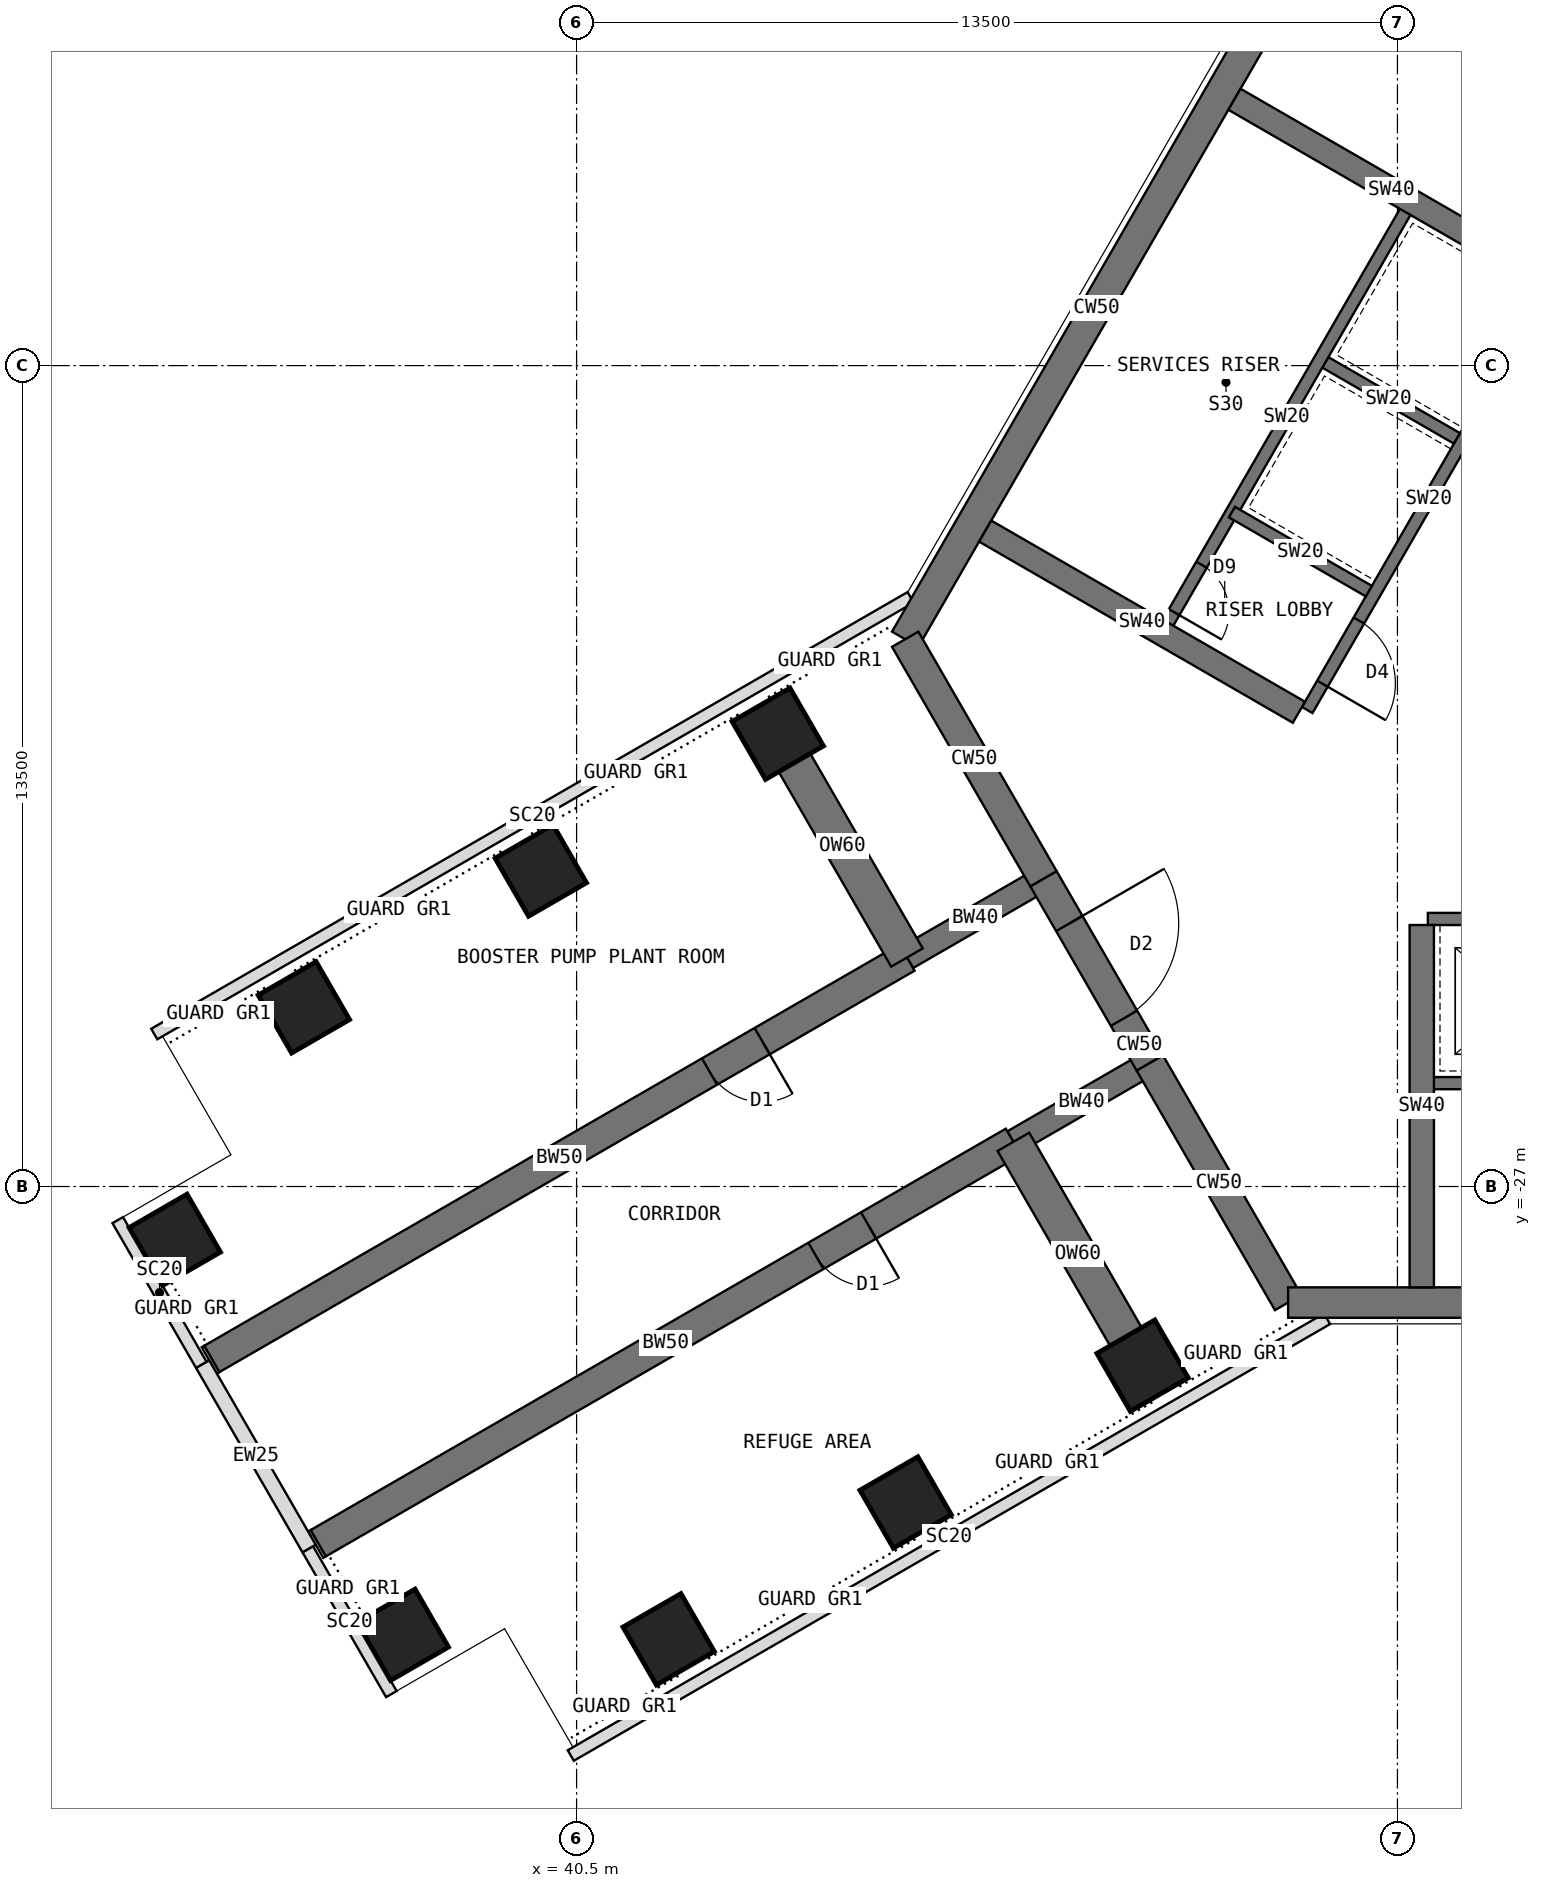
"""IFC4 building model, lengths in metres.
Left out: names, types, materials, properties, quantities, classifications, styles, units other than length and angle.
Written with IfcOpenShell. Run it as: python <this file> out.ifc"""

import sys

from ifc_helpers import new_model, si_unit, direction, frame, frame_2d, origin, origin_2d, place, context, subcontext, project, spatial, rectangle, extrude, element, fill, save


model = new_model("IFC4")
c1 = context("Model", 3, precision=1e-05, world=origin(), true_north=direction((0.0, 1.0)))
c2 = subcontext(c1, "Body", "Model", "MODEL_VIEW")
j1 = project(units=[si_unit("LENGTHUNIT", "METRE"), si_unit("PLANEANGLEUNIT", "RADIAN")], contexts=[c1])
p1 = place(None, origin())
s1 = spatial("IfcSite", under=j1, at=p1, CompositionType="ELEMENT")
p2 = place(p1, origin())
s2 = spatial("IfcBuilding", under=s1, at=p2, CompositionType="ELEMENT")
p3 = place(p2, frame((0.0, 0.0, 238.5)))
s3 = spatial("IfcBuildingStorey", under=s2, at=p3, CompositionType="ELEMENT", Elevation=238.5)
p4 = place(p3, frame((52.202, -7.092, 0.0), z_axis=(0.0, 0.0, 1.0), x_axis=(-0.500005998175, -0.866021940709, 0.0)))
e1 = element("IfcWall", 1, at=p4, inside=s3, PredefinedType="SHEAR", context=c2, shape_type="SweptSolid", body=[
    extrude(rectangle(XDim=12.596, YDim=0.5, at=frame_2d((6.298, 0.0))), origin(), (0.0, 0.0, 1.0), 5.0),
])
p5 = place(p3, frame((45.904, -18.0, 0.0), z_axis=(0.0, 0.0, 1.0), x_axis=(0.500024481964, -0.866011268655, 0.0)))
e2 = element("IfcWall", 2, at=p5, inside=s3, PredefinedType="SHEAR", context=c2, shape_type="SweptSolid", body=[
    extrude(rectangle(XDim=4.548, YDim=0.5, at=frame_2d((2.274, 0.0))), origin(), (0.0, 0.0, 1.0), 5.0),
])
p6 = place(p3, frame((48.178, -21.939, 0.0), z_axis=(0.0, 0.0, 1.0), x_axis=(0.500010275428, -0.866019471182, 0.0)))
e3 = element("IfcWall", 3, at=p6, inside=s3, PredefinedType="SHEAR", context=c2, shape_type="SweptSolid", body=[
    extrude(rectangle(XDim=3.5, YDim=0.5, at=frame_2d((1.75, 0.0))), origin(), (0.0, 0.0, 1.0), 5.0),
])
p7 = place(p6, frame((0.85, 0.0, 0.0)))
e4 = element("IfcOpeningElement", 4, at=p7, cuts=e3, PredefinedType="OPENING", context=c2, shape_type="SweptSolid", body=[
    extrude(rectangle(XDim=1.8, YDim=2.1, at=frame_2d((0.9, 1.05))), frame((0.0, 0.26, 0.0), z_axis=(0.0, -1.0, 0.0), x_axis=(1.0, 0.0, 0.0)), (0.0, 0.0, 1.0), 0.52),
])
p8 = place(p3, frame((49.928, -24.97, 0.0), z_axis=(0.0, 0.0, 1.0), x_axis=(0.499984222037, -0.866034513004, 0.0)))
e5 = element("IfcWall", 5, at=p8, inside=s3, PredefinedType="SHEAR", context=c2, shape_type="SweptSolid", body=[
    extrude(rectangle(XDim=4.548, YDim=0.5, at=frame_2d((2.274, 0.0))), origin(), (0.0, 0.0, 1.0), 5.0),
])
p9 = place(p3, frame((52.202, -28.908, 0.0), z_axis=(0.0, 0.0, 1.0), x_axis=(1.0, 0.0, 0.0)))
e6 = element("IfcWall", 6, at=p9, inside=s3, PredefinedType="SHEAR", context=c2, shape_type="SweptSolid", body=[
    extrude(rectangle(XDim=12.596, YDim=0.5, at=frame_2d((6.298, 0.0))), origin(), (0.0, 0.0, 1.0), 5.0),
])
p10 = place(p3, frame((49.928, -24.97, 0.0), z_axis=(0.0, 0.0, 1.0), x_axis=(-0.866031863473, -0.499988811324, 0.0)))
e7 = element("IfcWall", 7, at=p10, inside=s3, PredefinedType="SHEAR", context=c2, shape_type="SweptSolid", body=[
    extrude(rectangle(XDim=2.592, YDim=0.4, at=frame_2d((1.296, 0.0))), origin(), (0.0, 0.0, 1.0), 5.0),
])
p11 = place(p3, frame((47.684, -26.266, 0.0), z_axis=(0.0, 0.0, 1.0), x_axis=(-0.866027579429, -0.499996231654, 0.0)))
e8 = element("IfcWall", 8, at=p11, inside=s3, PredefinedType="SHEAR", context=c2, shape_type="SweptSolid", body=[
    extrude(rectangle(XDim=13.2, YDim=0.5, at=frame_2d((6.6, 0.0))), origin(), (0.0, 0.0, 1.0), 5.0),
])
p12 = place(p11, frame((2.75, 0.0, 0.0)))
e9 = element("IfcOpeningElement", 9, at=p12, cuts=e8, PredefinedType="OPENING", context=c2, shape_type="SweptSolid", body=[
    extrude(rectangle(XDim=1.0, YDim=2.1, at=frame_2d((0.5, 1.05))), frame((0.0, 0.26, 0.0), z_axis=(0.0, -1.0, 0.0), x_axis=(1.0, 0.0, 0.0)), (0.0, 0.0, 1.0), 0.52),
])
p13 = place(p3, frame((48.178, -21.939, 0.0), z_axis=(0.0, 0.0, 1.0), x_axis=(-0.866072649678, -0.499918158782, 0.0)))
e10 = element("IfcWall", 10, at=p13, inside=s3, PredefinedType="SHEAR", context=c2, shape_type="SweptSolid", body=[
    extrude(rectangle(XDim=2.592, YDim=0.4, at=frame_2d((1.296, 0.0))), origin(), (0.0, 0.0, 1.0), 5.0),
])
p14 = place(p3, frame((45.934, -23.234, 0.0), z_axis=(0.0, 0.0, 1.0), x_axis=(-0.866019570528, -0.500010103361, 0.0)))
e11 = element("IfcWall", 11, at=p14, inside=s3, PredefinedType="SHEAR", context=c2, shape_type="SweptSolid", body=[
    extrude(rectangle(XDim=13.2, YDim=0.5, at=frame_2d((6.6, 0.0))), origin(), (0.0, 0.0, 1.0), 5.0),
])
p15 = place(p14, frame((2.75, 0.0, 0.0)))
e12 = element("IfcOpeningElement", 12, at=p15, cuts=e11, PredefinedType="OPENING", context=c2, shape_type="SweptSolid", body=[
    extrude(rectangle(XDim=1.0, YDim=2.1, at=frame_2d((0.5, 1.05))), frame((0.0, 0.26, 0.0), z_axis=(0.0, -1.0, 0.0), x_axis=(1.0, 0.0, 0.0)), (0.0, 0.0, 1.0), 0.52),
])
for number, where, z_axis, x_axis in (
    (13, (49.809, -29.946, 0.0), (0.0, 0.0, 1.0), (0.866, 0.5, 0.0)),
    (14, (43.809, -19.554, 0.0), (0.0, 0.0, 1.0), (0.866, 0.5, 0.0)),
    (15, (45.912, -32.196, 0.0), (0.0, 0.0, 1.0), (0.866, 0.5, 0.0)),
    (16, (39.912, -21.804, 0.0), (0.0, 0.0, 1.0), (0.866, 0.5, 0.0)),
    (17, (42.014, -34.446, 0.0), (0.0, 0.0, 1.0), (0.866, 0.5, 0.0)),
    (18, (36.014, -24.054, 0.0), (0.0, 0.0, 1.0), (0.866, 0.5, 0.0)),
    (19, (37.642, -34.373, 0.0), (0.0, 0.0, 1.0), (0.866, 0.5, 0.0)),
    (20, (33.892, -27.877, 0.0), (0.0, 0.0, 1.0), (0.866, 0.5, 0.0)),
):
    element("IfcColumn", number, at=place(p3, frame(where, z_axis=z_axis, x_axis=x_axis)), inside=s3, PredefinedType="COLUMN", context=c2, shape_type="SweptSolid", body=[
        extrude(rectangle(XDim=1.1, YDim=1.1, at=origin_2d()), origin(), (0.0, 0.0, 1.0), 5.0),
    ])
for number, where, z_axis, x_axis in (
    (21, (47.684, -26.266, 0.0), (0.0, 0.0, 1.0), (0.5, -0.866, 0.0)),
    (22, (45.934, -23.234, 0.0), (0.0, 0.0, 1.0), (-0.5, 0.866, 0.0)),
):
    element("IfcWall", number, at=place(p3, frame(where, z_axis=z_axis, x_axis=x_axis)), inside=s3, PredefinedType="SHEAR", context=c2, shape_type="SweptSolid", body=[
        extrude(rectangle(XDim=4.25, YDim=0.6, at=frame_2d((2.125, 0.0))), origin(), (0.0, 0.0, 1.0), 5.0),
    ])
p16 = place(p3, frame((52.843, -29.176, 0.0), z_axis=(0.0, 0.0, 1.0), x_axis=(-0.866024237261, -0.500002020472, 0.0)))
e23 = element("IfcWall", 23, at=p16, inside=s3, PredefinedType="USERDEFINED", context=c2, shape_type="SweptSolid", body=[
    extrude(rectangle(XDim=14.363, YDim=0.2, at=frame_2d((7.181, 0.0))), origin(), (0.0, 0.0, 1.0), 4.8),
])
p17 = place(p3, frame((33.554, -24.493, 0.0), z_axis=(0.0, 0.0, 1.0), x_axis=(0.866028486751, 0.499994660107, 0.0)))
e24 = element("IfcWall", 24, at=p17, inside=s3, PredefinedType="USERDEFINED", context=c2, shape_type="SweptSolid", body=[
    extrude(rectangle(XDim=14.363, YDim=0.2, at=frame_2d((7.182, 0.0))), origin(), (0.0, 0.0, 1.0), 4.8),
])
p18 = place(p3, frame((32.954, -27.553, 0.0), z_axis=(0.0, 0.0, 1.0), x_axis=(0.499996545922, -0.866027397988, 0.0)))
e25 = element("IfcWall", 25, at=p18, inside=s3, PredefinedType="USERDEFINED", context=c2, shape_type="SweptSolid", body=[
    extrude(rectangle(XDim=2.75, YDim=0.2, at=frame_2d((1.375, 0.0))), origin(), (0.0, 0.0, 1.0), 4.8),
])
p19 = place(p3, frame((34.351, -29.922, 0.0), z_axis=(0.0, 0.0, 1.0), x_axis=(0.499980071345, -0.866036909293, 0.0)))
e26 = element("IfcWall", 26, at=p19, inside=s3, PredefinedType="STANDARD", context=c2, shape_type="SweptSolid", body=[
    extrude(rectangle(XDim=3.5, YDim=0.25, at=frame_2d((1.75, 0.0))), origin(), (0.0, 0.0, 1.0), 4.8),
])
p20 = place(p3, frame((36.079, -32.966, 0.0), z_axis=(0.0, 0.0, 1.0), x_axis=(0.499996545922, -0.866027397988, 0.0)))
e27 = element("IfcWall", 27, at=p20, inside=s3, PredefinedType="USERDEFINED", context=c2, shape_type="SweptSolid", body=[
    extrude(rectangle(XDim=2.75, YDim=0.2, at=frame_2d((1.375, 0.0))), origin(), (0.0, 0.0, 1.0), 4.8),
])
p21 = place(p3, frame((36.252, -32.865, 0.0), z_axis=(0.0, 0.0, 1.0), x_axis=(-0.86553723574, -0.500844580232, 0.0)))
e28 = element("IfcWall", 28, at=p21, inside=s3, PredefinedType="PARTITIONING", context=c2, shape_type="SweptSolid", body=[
    extrude(rectangle(XDim=0.05, YDim=0.5, at=frame_2d((0.025, 0.0))), origin(), (0.0, 0.0, 1.0), 4.8),
])
p22 = place(p3, frame((34.502, -29.834, 0.0), z_axis=(0.0, 0.0, 1.0), x_axis=(-0.867642581652, -0.497188445666, 0.0)))
e29 = element("IfcWall", 29, at=p22, inside=s3, PredefinedType="PARTITIONING", context=c2, shape_type="SweptSolid", body=[
    extrude(rectangle(XDim=0.05, YDim=0.5, at=frame_2d((0.025, 0.0))), origin(), (0.0, 0.0, 1.0), 4.8),
])
p23 = place(p3, frame((56.516, -12.236, 0.0), z_axis=(0.0, 0.0, 1.0), x_axis=(-0.49999894854, -0.866026010844, 0.0)))
e30 = element("IfcWall", 30, at=p23, inside=s3, PredefinedType="SHEAR", context=c2, shape_type="SweptSolid", body=[
    extrude(rectangle(XDim=8.0, YDim=0.2, at=frame_2d((4.0, 0.0))), origin(), (0.0, 0.0, 1.0), 5.0),
])
p24 = place(p23, frame((6.3, 0.0, 0.0)))
e31 = element("IfcOpeningElement", 31, at=p24, cuts=e30, PredefinedType="OPENING", context=c2, shape_type="SweptSolid", body=[
    extrude(rectangle(XDim=1.2, YDim=2.1, at=frame_2d((0.6, 1.05))), frame((0.0, 0.11, 0.0), z_axis=(0.0, -1.0, 0.0), x_axis=(1.0, 0.0, 0.0)), (0.0, 0.0, 1.0), 0.22),
])
for number, where, z_axis, x_axis in (
    (32, (54.98, -14.697, 0.0), (0.0, 0.0, 1.0), (-0.866, 0.5, 0.0)),
    (33, (53.53, -17.209, 0.0), (0.0, 0.0, 1.0), (-0.866, 0.5, 0.0)),
):
    element("IfcWall", number, at=place(p3, frame(where, z_axis=z_axis, x_axis=x_axis)), inside=s3, PredefinedType="SHEAR", context=c2, shape_type="SweptSolid", body=[
        extrude(rectangle(XDim=2.6, YDim=0.2, at=frame_2d((1.3, 0.0))), origin(), (0.0, 0.0, 1.0), 5.0),
    ])
p25 = place(p3, frame((54.178, -10.886, 0.0), z_axis=(0.0, 0.0, 1.0), x_axis=(-0.49999894854, -0.866026010844, 0.0)))
e34 = element("IfcWall", 34, at=p25, inside=s3, PredefinedType="SHEAR", context=c2, shape_type="SweptSolid", body=[
    extrude(rectangle(XDim=8.0, YDim=0.2, at=frame_2d((4.0, 0.0))), origin(), (0.0, 0.0, 1.0), 5.0),
])
p26 = place(p25, frame((6.8, 0.0, 0.0)))
e35 = element("IfcOpeningElement", 35, at=p26, cuts=e34, PredefinedType="OPENING", context=c2, shape_type="SweptSolid", body=[
    extrude(rectangle(XDim=0.9, YDim=2.1, at=frame_2d((0.45, 1.05))), frame((0.0, 0.11, 0.0), z_axis=(0.0, -1.0, 0.0), x_axis=(1.0, 0.0, 0.0)), (0.0, 0.0, 1.0), 0.22),
])
p27 = place(p3, frame((52.38, -19.201, 0.0), z_axis=(0.0, 0.0, 1.0), x_axis=(-0.866012946976, 0.500021575205, 0.0)))
e36 = element("IfcWall", 36, at=p27, inside=s3, PredefinedType="SHEAR", context=c2, shape_type="SweptSolid", body=[
    extrude(rectangle(XDim=5.958, YDim=0.4, at=frame_2d((2.979, 0.0))), origin(), (0.0, 0.0, 1.0), 5.0),
])
p28 = place(p3, frame((56.48, -12.099, 0.0), z_axis=(0.0, 0.0, 1.0), x_axis=(-0.86602319114, 0.500003832394, 0.0)))
e37 = element("IfcWall", 37, at=p28, inside=s3, PredefinedType="SHEAR", context=c2, shape_type="SweptSolid", body=[
    extrude(rectangle(XDim=5.958, YDim=0.4, at=frame_2d((2.979, 0.0))), origin(), (0.0, 0.0, 1.0), 5.0),
])
p29 = place(p3, frame((54.5, -22.6, 0.0), z_axis=(0.0, 0.0, 1.0), x_axis=(1.0, 0.0, 0.0)))
e38 = element("IfcWall", 38, at=p29, inside=s3, PredefinedType="SHEAR", context=c2, shape_type="SweptSolid", body=[
    extrude(rectangle(XDim=8.0, YDim=0.2, at=frame_2d((4.0, 0.0))), origin(), (0.0, 0.0, 1.0), 5.0),
])
p30 = place(p29, frame((6.3, 0.0, 0.0)))
e39 = element("IfcOpeningElement", 39, at=p30, cuts=e38, PredefinedType="OPENING", context=c2, shape_type="SweptSolid", body=[
    extrude(rectangle(XDim=1.2, YDim=2.1, at=frame_2d((0.6, 1.05))), frame((0.0, 0.11, 0.0), z_axis=(0.0, -1.0, 0.0), x_axis=(1.0, 0.0, 0.0)), (0.0, 0.0, 1.0), 0.22),
])
p31 = place(p29, frame((0.9, 0.0, 0.0)))
e40 = element("IfcOpeningElement", 40, at=p31, cuts=e38, PredefinedType="OPENING", context=c2, shape_type="SweptSolid", body=[
    extrude(rectangle(XDim=1.1, YDim=2.2, at=frame_2d((0.55, 1.1))), frame((0.0, 0.11, 0.0), z_axis=(0.0, -1.0, 0.0), x_axis=(1.0, 0.0, 0.0)), (0.0, 0.0, 1.0), 0.22),
])
p32 = place(p3, frame((54.5, -25.3, 0.0), z_axis=(0.0, 0.0, 1.0), x_axis=(1.0, 0.0, 0.0)))
e41 = element("IfcWall", 41, at=p32, inside=s3, PredefinedType="SHEAR", context=c2, shape_type="SweptSolid", body=[
    extrude(rectangle(XDim=8.0, YDim=0.2, at=frame_2d((4.0, 0.0))), origin(), (0.0, 0.0, 1.0), 5.0),
])
p33 = place(p32, frame((6.7, 0.0, 0.0)))
e42 = element("IfcOpeningElement", 42, at=p33, cuts=e41, PredefinedType="OPENING", context=c2, shape_type="SweptSolid", body=[
    extrude(rectangle(XDim=1.1, YDim=2.1, at=frame_2d((0.55, 1.05))), frame((0.0, 0.11, 0.0), z_axis=(0.0, -1.0, 0.0), x_axis=(1.0, 0.0, 0.0)), (0.0, 0.0, 1.0), 0.22),
])
p34 = place(p3, frame((54.4, -22.7, 0.0), z_axis=(0.0, 0.0, 1.0), x_axis=(0.0, -1.0, 0.0)))
e43 = element("IfcWall", 43, at=p34, inside=s3, PredefinedType="SHEAR", context=c2, shape_type="SweptSolid", body=[
    extrude(rectangle(XDim=5.958, YDim=0.4, at=frame_2d((2.979, 0.0))), origin(), (0.0, 0.0, 1.0), 5.0),
])
p35 = place(p24, origin())
e44 = element("IfcDoor", 44, at=p35, inside=s3, OperationType="SINGLE_SWING_RIGHT", PredefinedType="DOOR", context=c2, shape_type="SweptSolid", body=[
    extrude(rectangle(XDim=1.2, YDim=2.1, at=frame_2d((0.6, 1.05))), frame((0.0, 0.025, 0.0), z_axis=(0.0, -1.0, 0.0), x_axis=(1.0, 0.0, 0.0)), (0.0, 0.0, 1.0), 0.05),
])
fill(e31, e44)
p36 = place(p26, origin())
e45 = element("IfcDoor", 45, at=p36, inside=s3, OperationType="SINGLE_SWING_RIGHT", PredefinedType="DOOR", context=c2, shape_type="SweptSolid", body=[
    extrude(rectangle(XDim=0.9, YDim=2.1, at=frame_2d((0.45, 1.05))), frame((0.0, 0.025, 0.0), z_axis=(0.0, -1.0, 0.0), x_axis=(1.0, 0.0, 0.0)), (0.0, 0.0, 1.0), 0.05),
])
fill(e35, e45)
p37 = place(p7, origin())
e46 = element("IfcDoor", 46, at=p37, inside=s3, OperationType="DOUBLE_DOOR_DOUBLE_SWING", PredefinedType="DOOR", context=c2, shape_type="SweptSolid", body=[
    extrude(rectangle(XDim=1.8, YDim=2.1, at=frame_2d((0.9, 1.05))), frame((0.0, 0.025, 0.0), z_axis=(0.0, -1.0, 0.0), x_axis=(1.0, 0.0, 0.0)), (0.0, 0.0, 1.0), 0.05),
])
fill(e4, e46)
p38 = place(p12, origin())
e47 = element("IfcDoor", 47, at=p38, inside=s3, OperationType="SINGLE_SWING_LEFT", PredefinedType="DOOR", context=c2, shape_type="SweptSolid", body=[
    extrude(rectangle(XDim=1.0, YDim=2.1, at=frame_2d((0.5, 1.05))), frame((0.0, 0.025, 0.0), z_axis=(0.0, -1.0, 0.0), x_axis=(1.0, 0.0, 0.0)), (0.0, 0.0, 1.0), 0.05),
])
fill(e9, e47)
p39 = place(p15, origin())
e48 = element("IfcDoor", 48, at=p39, inside=s3, OperationType="SINGLE_SWING_LEFT", PredefinedType="DOOR", context=c2, shape_type="SweptSolid", body=[
    extrude(rectangle(XDim=1.0, YDim=2.1, at=frame_2d((0.5, 1.05))), frame((0.0, 0.025, 0.0), z_axis=(0.0, -1.0, 0.0), x_axis=(1.0, 0.0, 0.0)), (0.0, 0.0, 1.0), 0.05),
])
fill(e12, e48)
save(model, sys.argv[1])
